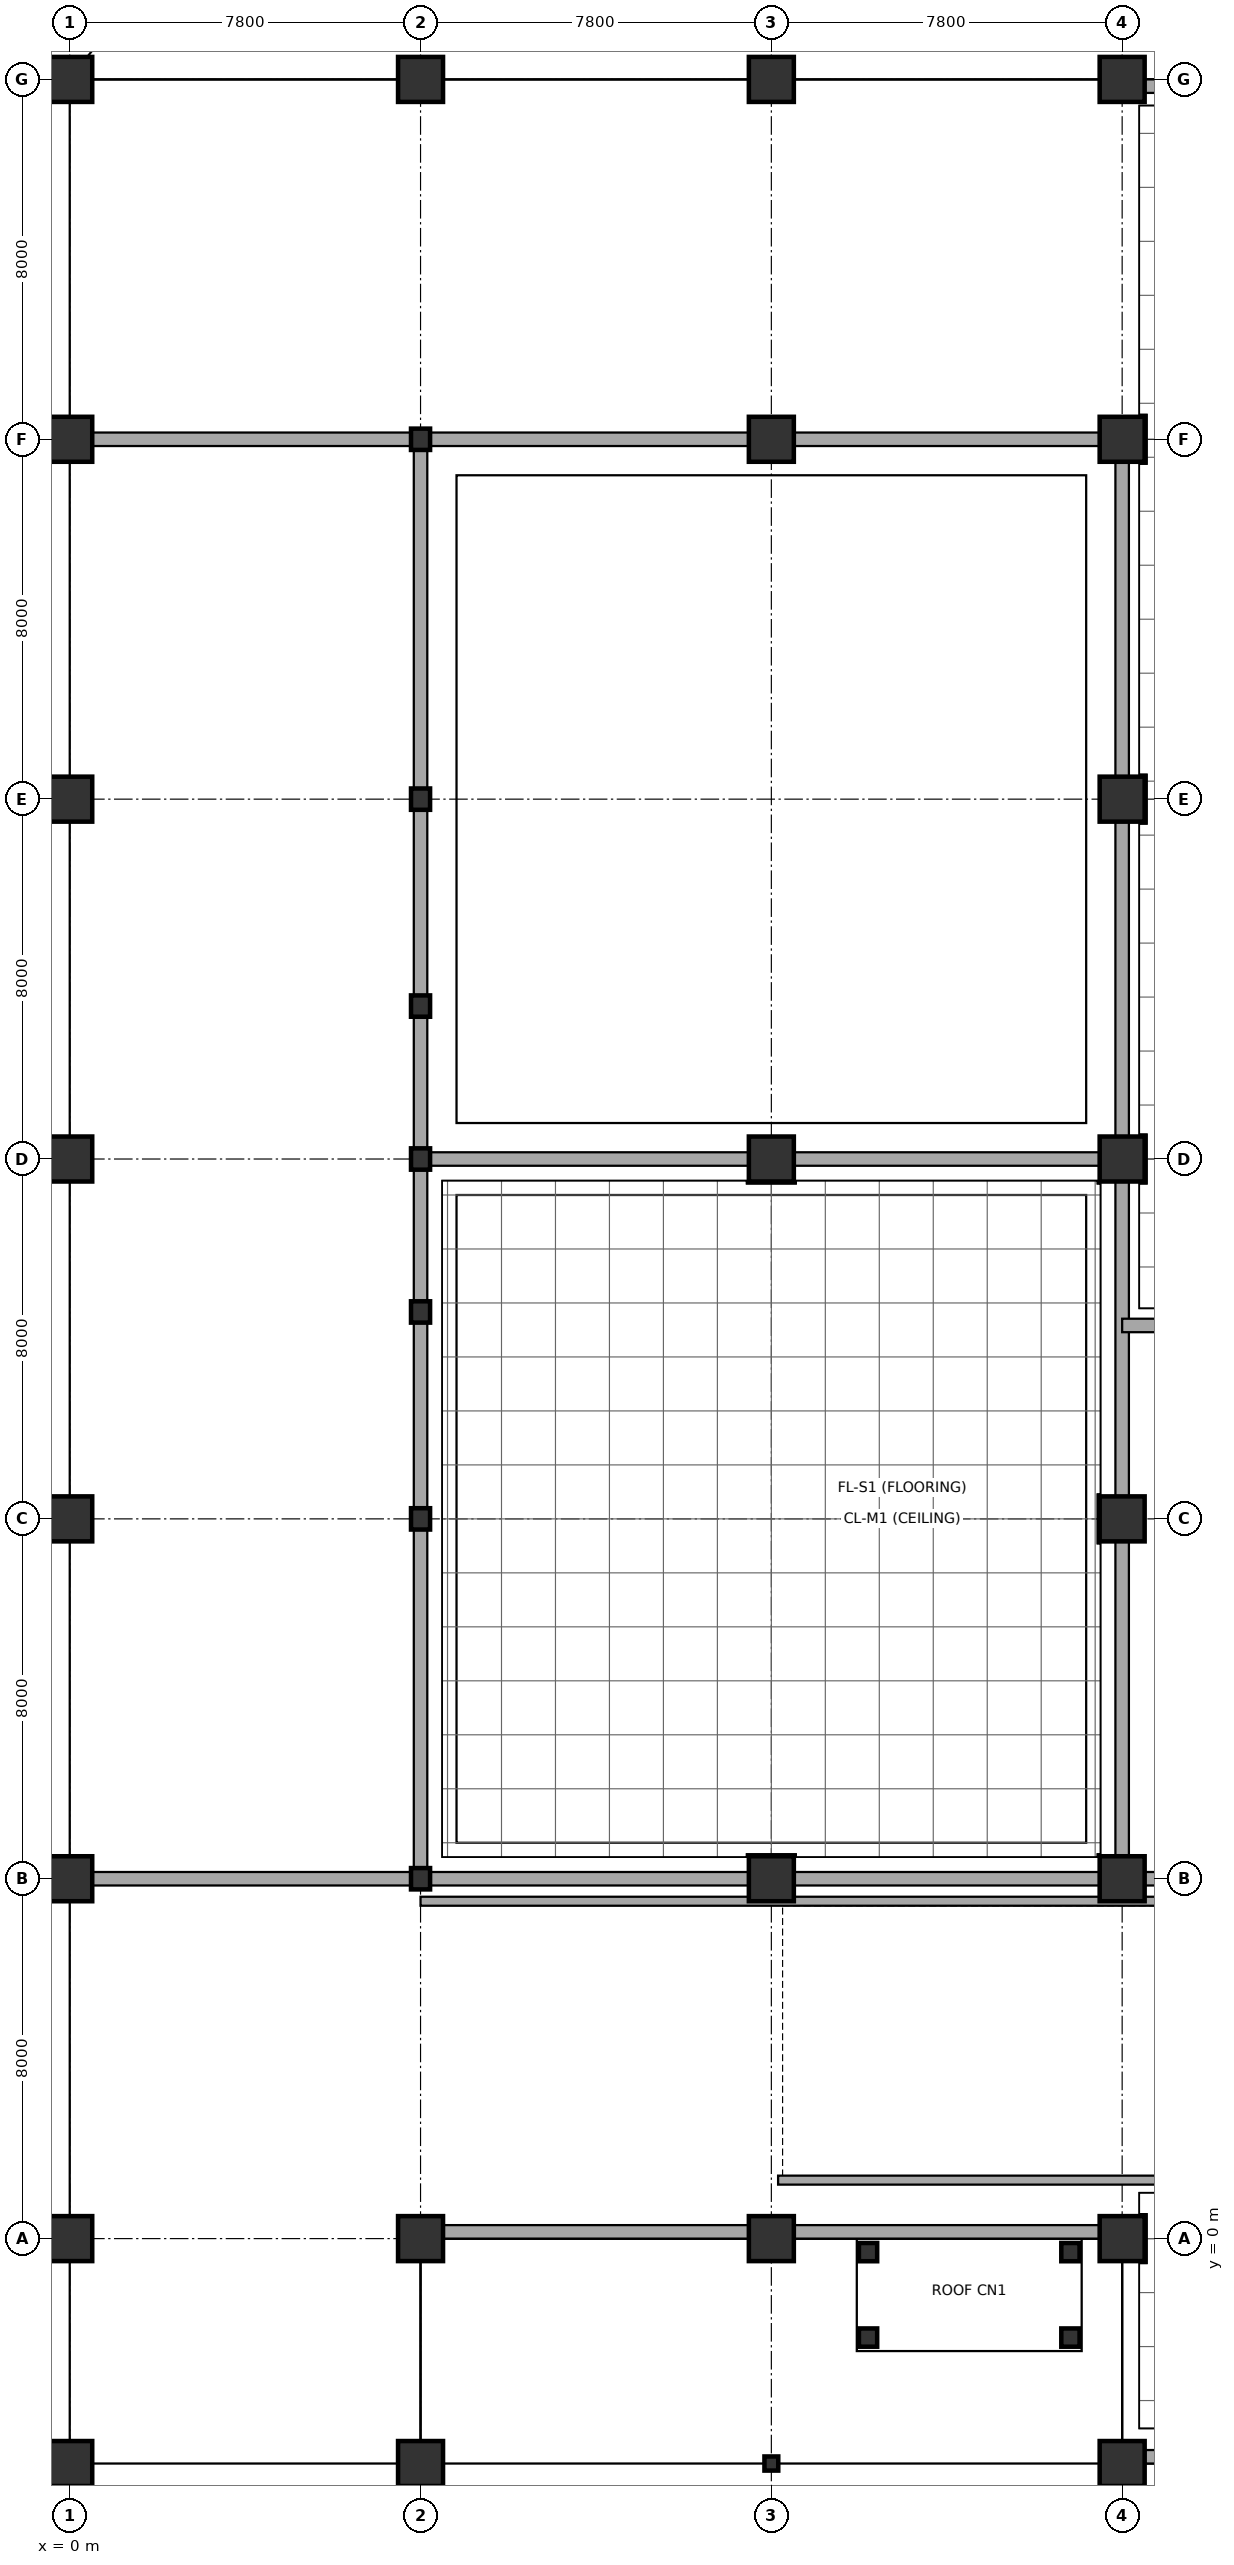
"""IFC4 building model, lengths in metres.
Left out: names, types, materials, properties, quantities, classifications, styles, units other than length and angle.
Written with IfcOpenShell. Run it as: python <this file> out.ifc"""

import sys

from ifc_helpers import new_model, si_unit, direction, frame, frame_2d, origin, origin_2d, place, context, subcontext, project, spatial, rectangle, hollow_circle, i_section, extrude, element, fill, save


model = new_model("IFC4")
c1 = context("Model", 3, precision=1e-05, world=origin(), true_north=direction((0.0, 1.0)))
c2 = subcontext(c1, "Body", "Model", "MODEL_VIEW")
j1 = project(units=[si_unit("LENGTHUNIT", "METRE"), si_unit("PLANEANGLEUNIT", "RADIAN")], contexts=[c1])
p1 = place(None, origin())
s1 = spatial("IfcSite", under=j1, at=p1, CompositionType="ELEMENT")
p2 = place(p1, origin())
s2 = spatial("IfcBuilding", under=s1, at=p2, CompositionType="ELEMENT")
p3 = place(p2, origin())
s3 = spatial("IfcBuildingStorey", under=s2, at=p3, CompositionType="ELEMENT", Elevation=0.0)
for number, where, z_axis, x_axis in (
    (1, (0.0, -5.0, 0.0), (0.0, 0.0, 1.0), (1.0, 0.0, 0.0)),
    (2, (0.0, 0.0, 0.0), (0.0, 0.0, 1.0), (1.0, 0.0, 0.0)),
    (3, (0.0, 8.0, 0.0), (0.0, 0.0, 1.0), (1.0, 0.0, 0.0)),
    (4, (0.0, 16.0, 0.0), (0.0, 0.0, 1.0), (1.0, 0.0, 0.0)),
    (5, (0.0, 24.0, 0.0), (0.0, 0.0, 1.0), (1.0, 0.0, 0.0)),
    (6, (0.0, 32.0, 0.0), (0.0, 0.0, 1.0), (1.0, 0.0, 0.0)),
    (7, (0.0, 40.0, 0.0), (0.0, 0.0, 1.0), (1.0, 0.0, 0.0)),
    (8, (0.0, 48.0, 0.0), (0.0, 0.0, 1.0), (1.0, 0.0, 0.0)),
    (9, (7.8, -5.0, 0.0), (0.0, 0.0, 1.0), (1.0, 0.0, 0.0)),
    (10, (7.8, 0.0, 0.0), (0.0, 0.0, 1.0), (1.0, 0.0, 0.0)),
):
    element("IfcColumn", number, at=place(p3, frame(where, z_axis=z_axis, x_axis=x_axis)), inside=s3, PredefinedType="COLUMN", context=c2, shape_type="SweptSolid", body=[
        extrude(rectangle(XDim=1.0, YDim=1.0, at=origin_2d()), origin(), (0.0, 0.0, 1.0), 5.395),
    ])
for number, where, z_axis, x_axis in (
    (11, (7.8, 8.0, 0.0), (0.0, 0.0, 1.0), (1.0, 0.0, 0.0)),
    (12, (7.8, 16.0, 0.0), (0.0, 0.0, 1.0), (1.0, 0.0, 0.0)),
    (13, (7.8, 24.0, 0.0), (0.0, 0.0, 1.0), (1.0, 0.0, 0.0)),
    (14, (7.8, 32.0, 0.0), (0.0, 0.0, 1.0), (1.0, 0.0, 0.0)),
    (15, (7.8, 40.0, 0.0), (0.0, 0.0, 1.0), (1.0, 0.0, 0.0)),
):
    element("IfcColumn", number, at=place(p3, frame(where, z_axis=z_axis, x_axis=x_axis)), inside=s3, PredefinedType="COLUMN", context=c2, shape_type="SweptSolid", body=[
        extrude(i_section(OverallWidth=0.424, OverallDepth=0.474, WebThickness=0.048, FlangeThickness=0.077, at=origin_2d()), origin(), (0.0, 0.0, 1.0), 5.395),
    ])
p4 = place(p3, frame((7.8, 48.0, 0.0), z_axis=(0.0, 0.0, 1.0), x_axis=(1.0, 0.0, 0.0)))
e16 = element("IfcColumn", 16, at=p4, inside=s3, PredefinedType="COLUMN", context=c2, shape_type="SweptSolid", body=[
    extrude(rectangle(XDim=1.0, YDim=1.0, at=origin_2d()), origin(), (0.0, 0.0, 1.0), 5.395),
])
p5 = place(p3, frame((15.6, -5.0, 0.0), z_axis=(0.0, 0.0, 1.0), x_axis=(1.0, 0.0, 0.0)))
e17 = element("IfcColumn", 17, at=p5, inside=s3, PredefinedType="COLUMN", context=c2, shape_type="SweptSolid", body=[
    extrude(i_section(OverallWidth=0.307, OverallDepth=0.314, WebThickness=0.011, FlangeThickness=0.019, at=origin_2d()), origin(), (0.0, 0.0, 1.0), 5.395),
])
for number, where, z_axis, x_axis in (
    (18, (15.6, 0.0, 0.0), (0.0, 0.0, 1.0), (1.0, 0.0, 0.0)),
    (19, (15.6, 8.0, 0.0), (0.0, 0.0, 1.0), (1.0, 0.0, 0.0)),
    (20, (15.6, 24.0, 0.0), (0.0, 0.0, 1.0), (1.0, 0.0, 0.0)),
    (21, (15.6, 40.0, 0.0), (0.0, 0.0, 1.0), (1.0, 0.0, 0.0)),
    (22, (15.6, 48.0, 0.0), (0.0, 0.0, 1.0), (1.0, 0.0, 0.0)),
    (23, (23.4, -5.0, 0.0), (0.0, 0.0, 1.0), (1.0, 0.0, 0.0)),
    (24, (23.4, 0.0, 0.0), (0.0, 0.0, 1.0), (1.0, 0.0, 0.0)),
    (25, (23.4, 8.0, 0.0), (0.0, 0.0, 1.0), (1.0, 0.0, 0.0)),
    (26, (23.4, 16.0, 0.0), (0.0, 0.0, 1.0), (1.0, 0.0, 0.0)),
    (27, (23.4, 24.0, 0.0), (0.0, 0.0, 1.0), (1.0, 0.0, 0.0)),
    (28, (23.4, 32.0, 0.0), (0.0, 0.0, 1.0), (1.0, 0.0, 0.0)),
    (29, (23.4, 40.0, 0.0), (0.0, 0.0, 1.0), (1.0, 0.0, 0.0)),
    (30, (23.4, 48.0, 0.0), (0.0, 0.0, 1.0), (1.0, 0.0, 0.0)),
):
    element("IfcColumn", number, at=place(p3, frame(where, z_axis=z_axis, x_axis=x_axis)), inside=s3, PredefinedType="COLUMN", context=c2, shape_type="SweptSolid", body=[
        extrude(rectangle(XDim=1.0, YDim=1.0, at=origin_2d()), origin(), (0.0, 0.0, 1.0), 5.395),
    ])
for number, where, z_axis, x_axis in (
    (31, (7.8, 20.6, 0.0), (0.0, 0.0, 1.0), (1.0, 0.0, 0.0)),
    (32, (7.8, 27.4, 0.0), (0.0, 0.0, 1.0), (1.0, 0.0, 0.0)),
):
    element("IfcColumn", number, at=place(p3, frame(where, z_axis=z_axis, x_axis=x_axis)), inside=s3, PredefinedType="COLUMN", context=c2, shape_type="SweptSolid", body=[
        extrude(i_section(OverallWidth=0.424, OverallDepth=0.474, WebThickness=0.048, FlangeThickness=0.077, at=origin_2d()), origin(), (0.0, 0.0, 1.0), 5.394),
    ])
p6 = place(p3, frame((8.31, 0.15, 0.0), z_axis=(0.0, 0.0, 1.0), x_axis=(1.0, 0.0, 0.0)))
e33 = element("IfcWall", 33, at=p6, inside=s3, PredefinedType="STANDARD", context=c2, shape_type="SweptSolid", body=[
    extrude(rectangle(XDim=6.78, YDim=0.3, at=frame_2d((3.39, 0.0))), origin(), (0.0, 0.0, 1.0), 4.338),
])
p7 = place(p6, frame((0.3, 0.0, 0.0)))
e34 = element("IfcOpeningElement", 34, at=p7, cuts=e33, PredefinedType="OPENING", context=c2, shape_type="SweptSolid", body=[
    extrude(rectangle(XDim=6.2, YDim=2.8, at=frame_2d((3.1, 1.4))), frame((0.0, 0.16, 0.0), z_axis=(0.0, -1.0, 0.0), x_axis=(1.0, 0.0, 0.0)), (0.0, 0.0, 1.0), 0.32),
])
p8 = place(p3, frame((16.11, 0.15, 0.0), z_axis=(0.0, 0.0, 1.0), x_axis=(1.0, 0.0, 0.0)))
e35 = element("IfcWall", 35, at=p8, inside=s3, PredefinedType="STANDARD", context=c2, shape_type="SweptSolid", body=[
    extrude(rectangle(XDim=6.78, YDim=0.3, at=frame_2d((3.39, 0.0))), origin(), (0.0, 0.0, 1.0), 4.338),
])
p9 = place(p8, frame((2.5, 0.0, 0.0)))
e36 = element("IfcOpeningElement", 36, at=p9, cuts=e35, PredefinedType="OPENING", context=c2, shape_type="SweptSolid", body=[
    extrude(rectangle(XDim=1.8, YDim=2.2, at=frame_2d((0.9, 1.1))), frame((0.0, 0.16, 0.0), z_axis=(0.0, -1.0, 0.0), x_axis=(1.0, 0.0, 0.0)), (0.0, 0.0, 1.0), 0.32),
])
p10 = place(p3, frame((23.91, -4.85, 0.0), z_axis=(0.0, 0.0, 1.0), x_axis=(1.0, 0.0, 0.0)))
e37 = element("IfcWall", 37, at=p10, inside=s3, PredefinedType="STANDARD", context=c2, shape_type="SweptSolid", body=[
    extrude(rectangle(XDim=6.78, YDim=0.3, at=frame_2d((3.39, 0.0))), origin(), (0.0, 0.0, 1.0), 4.415),
])
p11 = place(p10, frame((1.0, 0.0, 0.95)))
e38 = element("IfcOpeningElement", 38, at=p11, cuts=e37, PredefinedType="OPENING", context=c2, shape_type="SweptSolid", body=[
    extrude(rectangle(XDim=1.8, YDim=1.65, at=frame_2d((0.9, 0.825))), frame((0.0, 0.16, 0.0), z_axis=(0.0, -1.0, 0.0), x_axis=(1.0, 0.0, 0.0)), (0.0, 0.0, 1.0), 0.32),
])
p12 = place(p10, frame((3.6, 0.0, 0.0)))
e39 = element("IfcOpeningElement", 39, at=p12, cuts=e37, PredefinedType="OPENING", context=c2, shape_type="SweptSolid", body=[
    extrude(rectangle(XDim=1.8, YDim=2.2, at=frame_2d((0.9, 1.1))), frame((0.0, 0.16, 0.0), z_axis=(0.0, -1.0, 0.0), x_axis=(1.0, 0.0, 0.0)), (0.0, 0.0, 1.0), 0.32),
])
p13 = place(p3, frame((23.91, 47.85, 0.0), z_axis=(0.0, 0.0, 1.0), x_axis=(1.0, 0.0, 0.0)))
e40 = element("IfcWall", 40, at=p13, inside=s3, PredefinedType="STANDARD", context=c2, shape_type="SweptSolid", body=[
    extrude(rectangle(XDim=6.78, YDim=0.3, at=frame_2d((3.39, 0.0))), origin(), (0.0, 0.0, 1.0), 4.338),
])
p14 = place(p13, frame((2.39, 0.0, 0.0)))
e41 = element("IfcOpeningElement", 41, at=p14, cuts=e40, PredefinedType="OPENING", context=c2, shape_type="SweptSolid", body=[
    extrude(rectangle(XDim=2.0, YDim=2.4, at=frame_2d((1.0, 1.2))), frame((0.0, 0.16, 0.0), z_axis=(0.0, -1.0, 0.0), x_axis=(1.0, 0.0, 0.0)), (0.0, 0.0, 1.0), 0.32),
])
for number, where, z_axis, x_axis in (
    (42, (17.75, -2.2, 0.0), (0.0, 0.0, 1.0), (1.0, 0.0, 0.0)),
    (43, (22.25, -2.2, 0.0), (0.0, 0.0, 1.0), (1.0, 0.0, 0.0)),
    (44, (17.75, -0.3, 0.0), (0.0, 0.0, 1.0), (1.0, 0.0, 0.0)),
    (45, (22.25, -0.3, 0.0), (0.0, 0.0, 1.0), (1.0, 0.0, 0.0)),
):
    element("IfcColumn", number, at=place(p3, frame(where, z_axis=z_axis, x_axis=x_axis)), inside=s3, PredefinedType="PILASTER", context=c2, shape_type="SweptSolid", body=[
        extrude(hollow_circle(Radius=0.203, WallThickness=0.016, at=origin_2d()), origin(), (0.0, 0.0, 1.0), 3.62),
    ])
p15 = place(p3, frame((23.4, 8.0, 0.0), z_axis=(0.0, 0.0, 1.0), x_axis=(0.0, 1.0, 0.0)))
e46 = element("IfcWall", 46, at=p15, inside=s3, PredefinedType="PARTITIONING", context=c2, shape_type="SweptSolid", body=[
    extrude(rectangle(XDim=16.0, YDim=0.3, at=frame_2d((8.0, 0.0))), origin(), (0.0, 0.0, 1.0), 3.688),
])
p16 = place(p15, frame((12.8, 0.0, 0.0)))
e47 = element("IfcOpeningElement", 47, at=p16, cuts=e46, PredefinedType="OPENING", context=c2, shape_type="SweptSolid", body=[
    extrude(rectangle(XDim=1.8, YDim=2.4, at=frame_2d((0.9, 1.2))), frame((0.0, 0.16, 0.0), z_axis=(0.0, -1.0, 0.0), x_axis=(1.0, 0.0, 0.0)), (0.0, 0.0, 1.0), 0.32),
])
p17 = place(p3, frame((23.4, 24.0, 0.0), z_axis=(0.0, 0.0, 1.0), x_axis=(0.0, 1.0, 0.0)))
e48 = element("IfcWall", 48, at=p17, inside=s3, PredefinedType="PARTITIONING", context=c2, shape_type="SweptSolid", body=[
    extrude(rectangle(XDim=16.0, YDim=0.3, at=frame_2d((8.0, 0.0))), origin(), (0.0, 0.0, 1.0), 3.688),
])
p18 = place(p17, frame((4.2, 0.0, 0.0)))
e49 = element("IfcOpeningElement", 49, at=p18, cuts=e48, PredefinedType="OPENING", context=c2, shape_type="SweptSolid", body=[
    extrude(rectangle(XDim=1.8, YDim=2.4, at=frame_2d((0.9, 1.2))), frame((0.0, 0.16, 0.0), z_axis=(0.0, -1.0, 0.0), x_axis=(1.0, 0.0, 0.0)), (0.0, 0.0, 1.0), 0.32),
])
p19 = place(p3, frame((7.8, 24.0, 0.0), z_axis=(0.0, 0.0, 1.0), x_axis=(1.0, 0.0, 0.0)))
e50 = element("IfcWall", 50, at=p19, inside=s3, PredefinedType="PARTITIONING", context=c2, shape_type="SweptSolid", body=[
    extrude(rectangle(XDim=15.6, YDim=0.3, at=frame_2d((7.8, 0.0))), origin(), (0.0, 0.0, 1.0), 3.688),
])
p20 = place(p3, frame((7.8, 8.0, 0.0), z_axis=(0.0, 0.0, 1.0), x_axis=(0.0, 1.0, 0.0)))
e51 = element("IfcWall", 51, at=p20, inside=s3, PredefinedType="PARTITIONING", context=c2, shape_type="SweptSolid", body=[
    extrude(rectangle(XDim=32.0, YDim=0.3, at=frame_2d((16.0, 0.0))), origin(), (0.0, 0.0, 1.0), 3.688),
])
p21 = place(p20, frame((28.5, 0.0, 0.0)))
e52 = element("IfcOpeningElement", 52, at=p21, cuts=e51, PredefinedType="OPENING", context=c2, shape_type="SweptSolid", body=[
    extrude(rectangle(XDim=1.05, YDim=2.15, at=frame_2d((0.525, 1.075))), frame((0.0, 0.16, 0.0), z_axis=(0.0, -1.0, 0.0), x_axis=(1.0, 0.0, 0.0)), (0.0, 0.0, 1.0), 0.32),
])
p22 = place(p3, frame((0.15, 8.0, 0.0), z_axis=(0.0, 0.0, 1.0), x_axis=(1.0, 0.0, 0.0)))
e53 = element("IfcWall", 53, at=p22, inside=s3, PredefinedType="PARTITIONING", context=c2, shape_type="SweptSolid", body=[
    extrude(rectangle(XDim=23.25, YDim=0.3, at=frame_2d((11.625, 0.0))), origin(), (0.0, 0.0, 1.0), 3.688),
])
p23 = place(p22, frame((3.2, 0.0, 0.0)))
e54 = element("IfcOpeningElement", 54, at=p23, cuts=e53, PredefinedType="OPENING", context=c2, shape_type="SweptSolid", body=[
    extrude(rectangle(XDim=0.95, YDim=2.15, at=frame_2d((0.475, 1.075))), frame((0.0, 0.16, 0.0), z_axis=(0.0, -1.0, 0.0), x_axis=(1.0, 0.0, 0.0)), (0.0, 0.0, 1.0), 0.32),
])
p24 = place(p3, frame((0.15, 40.0, 0.0), z_axis=(0.0, 0.0, 1.0), x_axis=(1.0, 0.0, 0.0)))
e55 = element("IfcWall", 55, at=p24, inside=s3, PredefinedType="PARTITIONING", context=c2, shape_type="SweptSolid", body=[
    extrude(rectangle(XDim=23.25, YDim=0.3, at=frame_2d((11.625, 0.0))), origin(), (0.0, 0.0, 1.0), 3.688),
])
p25 = place(p24, frame((18.2, 0.0, 0.0)))
e56 = element("IfcOpeningElement", 56, at=p25, cuts=e55, PredefinedType="OPENING", context=c2, shape_type="SweptSolid", body=[
    extrude(rectangle(XDim=1.6, YDim=2.2, at=frame_2d((0.8, 1.1))), frame((0.0, 0.16, 0.0), z_axis=(0.0, -1.0, 0.0), x_axis=(1.0, 0.0, 0.0)), (0.0, 0.0, 1.0), 0.32),
])
p26 = place(p3, frame((23.4, 20.3, 0.0), z_axis=(0.0, 0.0, 1.0), x_axis=(1.0, 0.0, 0.0)))
e57 = element("IfcWall", 57, at=p26, inside=s3, PredefinedType="PARTITIONING", context=c2, shape_type="SweptSolid", body=[
    extrude(rectangle(XDim=11.5, YDim=0.3, at=frame_2d((5.75, 0.0))), origin(), (0.0, 0.0, 1.0), 3.688),
])
p27 = place(p26, frame((2.2, 0.0, 0.0)))
e58 = element("IfcOpeningElement", 58, at=p27, cuts=e57, PredefinedType="OPENING", context=c2, shape_type="SweptSolid", body=[
    extrude(rectangle(XDim=1.8, YDim=2.4, at=frame_2d((0.9, 1.2))), frame((0.0, 0.16, 0.0), z_axis=(0.0, -1.0, 0.0), x_axis=(1.0, 0.0, 0.0)), (0.0, 0.0, 1.0), 0.32),
])
p28 = place(p26, frame((8.4, 0.0, 0.0)))
e59 = element("IfcOpeningElement", 59, at=p28, cuts=e57, PredefinedType="OPENING", context=c2, shape_type="SweptSolid", body=[
    extrude(rectangle(XDim=1.6, YDim=2.4, at=frame_2d((0.8, 1.2))), frame((0.0, 0.16, 0.0), z_axis=(0.0, -1.0, 0.0), x_axis=(1.0, 0.0, 0.0)), (0.0, 0.0, 1.0), 0.32),
])
p29 = place(p3, frame((23.4, 8.0, 0.0), z_axis=(0.0, 0.0, 1.0), x_axis=(1.0, 0.0, 0.0)))
e60 = element("IfcWall", 60, at=p29, inside=s3, PredefinedType="PARTITIONING", context=c2, shape_type="SweptSolid", body=[
    extrude(rectangle(XDim=11.5, YDim=0.3, at=frame_2d((5.75, 0.0))), origin(), (0.0, 0.0, 1.0), 3.688),
])
p30 = place(p3, frame((7.8, 7.5, 0.0), z_axis=(0.0, 0.0, 1.0), x_axis=(1.0, 0.0, 0.0)))
e61 = element("IfcWall", 61, at=p30, inside=s3, PredefinedType="SOLIDWALL", context=c2, shape_type="SweptSolid", body=[
    extrude(rectangle(XDim=26.7, YDim=0.2, at=frame_2d((13.35, 0.0))), origin(), (0.0, 0.0, 1.0), 4.415),
])
p31 = place(p3, frame((15.75, 1.3, 0.0), z_axis=(0.0, 0.0, 1.0), x_axis=(1.0, 0.0, 0.0)))
e62 = element("IfcWall", 62, at=p31, inside=s3, PredefinedType="SOLIDWALL", context=c2, shape_type="SweptSolid", body=[
    extrude(rectangle(XDim=18.75, YDim=0.2, at=frame_2d((9.375, 0.0))), origin(), (0.0, 0.0, 1.0), 4.415),
])
p32 = place(p7, origin())
e63 = element("IfcDoor", 63, at=p32, inside=s3, OperationType="ROLLINGUP", PredefinedType="GATE", context=c2, shape_type="SweptSolid", body=[
    extrude(rectangle(XDim=6.2, YDim=2.8, at=frame_2d((3.1, 1.4))), frame((0.0, 0.025, 0.0), z_axis=(0.0, -1.0, 0.0), x_axis=(1.0, 0.0, 0.0)), (0.0, 0.0, 1.0), 0.05),
])
fill(e34, e63)
p33 = place(p9, frame((1.8, 0.0, 0.0), z_axis=(0.0, 0.0, 1.0), x_axis=(-1.0, 0.0, 0.0)))
e64 = element("IfcDoor", 64, at=p33, inside=s3, OperationType="SINGLE_SWING_LEFT", PredefinedType="DOOR", context=c2, shape_type="SweptSolid", body=[
    extrude(rectangle(XDim=1.8, YDim=2.2, at=frame_2d((0.9, 1.1))), frame((0.0, 0.025, 0.0), z_axis=(0.0, -1.0, 0.0), x_axis=(1.0, 0.0, 0.0)), (0.0, 0.0, 1.0), 0.05),
])
fill(e36, e64)
p34 = place(p16, origin())
e65 = element("IfcDoor", 65, at=p34, inside=s3, OperationType="SINGLE_SWING_LEFT", PredefinedType="DOOR", context=c2, shape_type="SweptSolid", body=[
    extrude(rectangle(XDim=1.8, YDim=2.4, at=frame_2d((0.9, 1.2))), frame((0.0, 0.025, 0.0), z_axis=(0.0, -1.0, 0.0), x_axis=(1.0, 0.0, 0.0)), (0.0, 0.0, 1.0), 0.05),
])
fill(e47, e65)
p35 = place(p18, origin())
e66 = element("IfcDoor", 66, at=p35, inside=s3, OperationType="SINGLE_SWING_LEFT", PredefinedType="DOOR", context=c2, shape_type="SweptSolid", body=[
    extrude(rectangle(XDim=1.8, YDim=2.4, at=frame_2d((0.9, 1.2))), frame((0.0, 0.025, 0.0), z_axis=(0.0, -1.0, 0.0), x_axis=(1.0, 0.0, 0.0)), (0.0, 0.0, 1.0), 0.05),
])
fill(e49, e66)
p36 = place(p21, frame((1.05, 0.0, 0.0), z_axis=(0.0, 0.0, 1.0), x_axis=(-1.0, 0.0, 0.0)))
e67 = element("IfcDoor", 67, at=p36, inside=s3, OperationType="SINGLE_SWING_LEFT", PredefinedType="DOOR", context=c2, shape_type="SweptSolid", body=[
    extrude(rectangle(XDim=1.05, YDim=2.15, at=frame_2d((0.525, 1.075))), frame((0.0, 0.025, 0.0), z_axis=(0.0, -1.0, 0.0), x_axis=(1.0, 0.0, 0.0)), (0.0, 0.0, 1.0), 0.05),
])
fill(e52, e67)
p37 = place(p23, frame((0.95, 0.0, 0.0), z_axis=(0.0, 0.0, 1.0), x_axis=(-1.0, 0.0, 0.0)))
e68 = element("IfcDoor", 68, at=p37, inside=s3, OperationType="SINGLE_SWING_LEFT", PredefinedType="DOOR", context=c2, shape_type="SweptSolid", body=[
    extrude(rectangle(XDim=0.95, YDim=2.15, at=frame_2d((0.475, 1.075))), frame((0.0, 0.025, 0.0), z_axis=(0.0, -1.0, 0.0), x_axis=(1.0, 0.0, 0.0)), (0.0, 0.0, 1.0), 0.05),
])
fill(e54, e68)
p38 = place(p25, origin())
e69 = element("IfcDoor", 69, at=p38, inside=s3, OperationType="SINGLE_SWING_LEFT", PredefinedType="DOOR", context=c2, shape_type="SweptSolid", body=[
    extrude(rectangle(XDim=1.6, YDim=2.2, at=frame_2d((0.8, 1.1))), frame((0.0, 0.025, 0.0), z_axis=(0.0, -1.0, 0.0), x_axis=(1.0, 0.0, 0.0)), (0.0, 0.0, 1.0), 0.05),
])
fill(e56, e69)
save(model, sys.argv[1])
